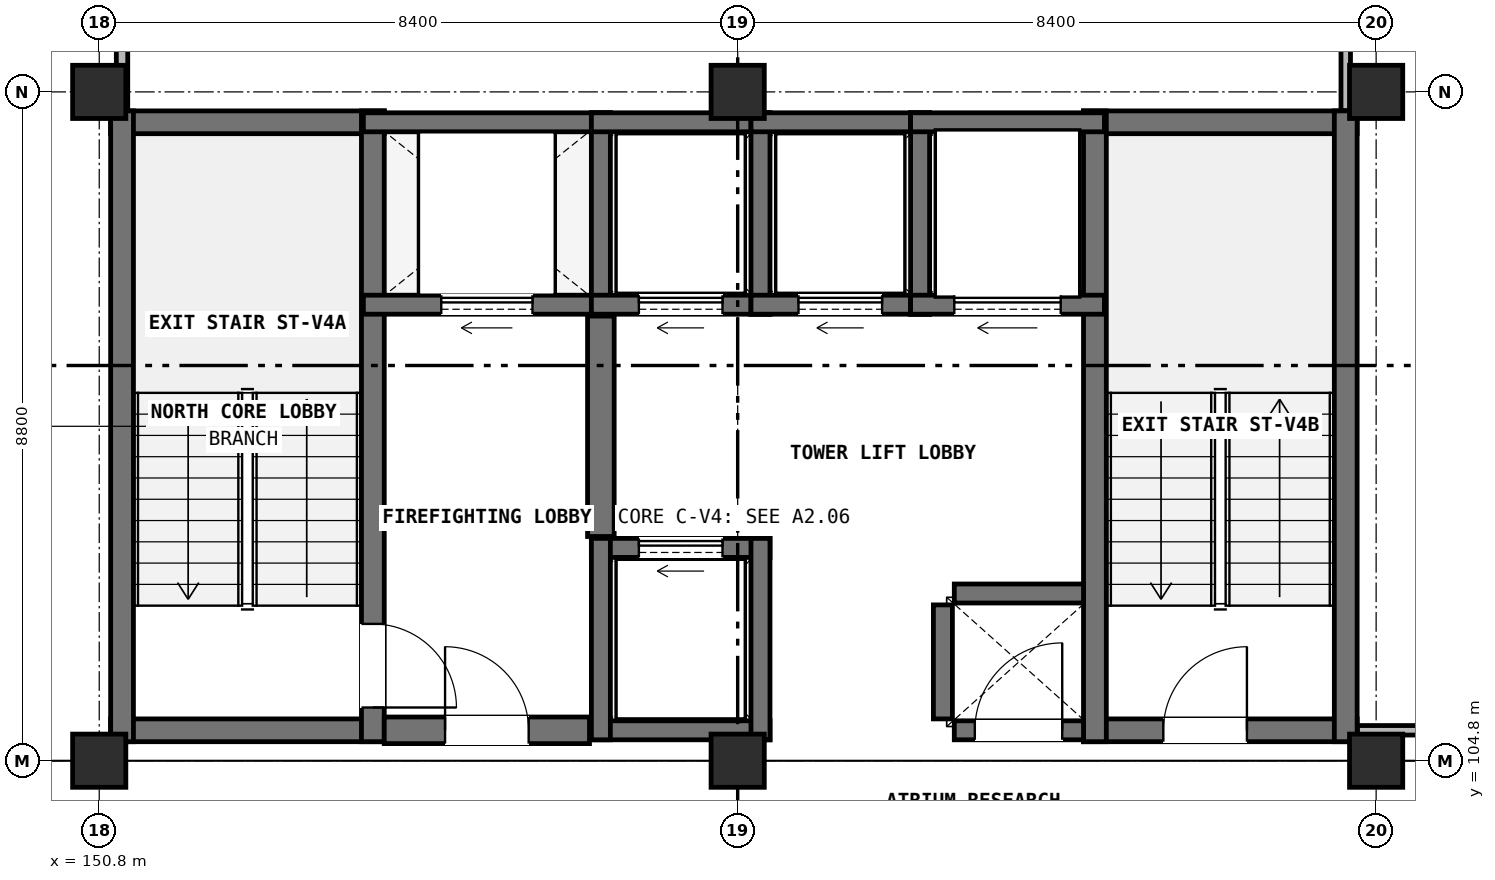
"""IFC4 building model, lengths in metres.
Left out: names, types, materials, properties, quantities, classifications, styles, units other than length and angle.
Written with IfcOpenShell. Run it as: python <this file> out.ifc"""

import sys

from ifc_helpers import new_model, si_unit, direction, frame, frame_2d, origin, origin_2d, place, context, subcontext, project, spatial, rectangle, extrude, element, fill, save


model = new_model("IFC4")
c1 = context("Model", 3, precision=1e-05, world=origin(), true_north=direction((0.0, 1.0)))
c2 = subcontext(c1, "Body", "Model", "MODEL_VIEW")
j1 = project(units=[si_unit("LENGTHUNIT", "METRE"), si_unit("PLANEANGLEUNIT", "RADIAN")], contexts=[c1])
p1 = place(None, origin())
s1 = spatial("IfcSite", under=j1, at=p1, CompositionType="ELEMENT")
p2 = place(p1, origin())
s2 = spatial("IfcBuilding", under=s1, at=p2, CompositionType="ELEMENT")
p3 = place(p2, frame((0.0, 0.0, 36.8)))
s3 = spatial("IfcBuildingStorey", under=s2, at=p3, CompositionType="ELEMENT", Elevation=36.8)
for number, where, z_axis, x_axis in (
    (1, (150.8, 104.8, 0.0), (0.0, 0.0, 1.0), (1.0, 0.0, 0.0)),
    (2, (150.8, 113.6, 0.0), (0.0, 0.0, 1.0), (1.0, 0.0, 0.0)),
    (3, (159.2, 104.8, 0.0), (0.0, 0.0, 1.0), (1.0, 0.0, 0.0)),
    (4, (159.2, 113.6, 0.0), (0.0, 0.0, 1.0), (1.0, 0.0, 0.0)),
    (5, (167.6, 104.8, 0.0), (0.0, 0.0, 1.0), (1.0, 0.0, 0.0)),
    (6, (167.6, 113.6, 0.0), (0.0, 0.0, 1.0), (1.0, 0.0, 0.0)),
):
    element("IfcColumn", number, at=place(p3, frame(where, z_axis=z_axis, x_axis=x_axis)), inside=s3, PredefinedType="COLUMN", context=c2, shape_type="SweptSolid", body=[
        extrude(rectangle(XDim=0.7, YDim=0.7, at=origin_2d()), origin(), (0.0, 0.0, 1.0), 3.8),
    ])
for number, where, z_axis, x_axis in (
    (7, (150.95, 105.2, 0.0), (0.0, 0.0, 1.0), (1.0, 0.0, 0.0)),
    (8, (150.95, 113.2, 0.0), (0.0, 0.0, 1.0), (1.0, 0.0, 0.0)),
):
    element("IfcWall", number, at=place(p3, frame(where, z_axis=z_axis, x_axis=x_axis)), inside=s3, PredefinedType="SHEAR", context=c2, shape_type="SweptSolid", body=[
        extrude(rectangle(XDim=3.6, YDim=0.3, at=frame_2d((1.8, 0.0))), origin(), (0.0, 0.0, 1.0), 3.8),
    ])
p4 = place(p3, frame((151.1, 105.05, 0.0), z_axis=(0.0, 0.0, 1.0), x_axis=(0.0, 1.0, 0.0)))
e9 = element("IfcWall", 9, at=p4, inside=s3, PredefinedType="SHEAR", context=c2, shape_type="SweptSolid", body=[
    extrude(rectangle(XDim=8.3, YDim=0.3, at=frame_2d((4.15, 0.0))), origin(), (0.0, 0.0, 1.0), 3.8),
])
p5 = place(p3, frame((154.4, 105.05, 0.0), z_axis=(0.0, 0.0, 1.0), x_axis=(0.0, 1.0, 0.0)))
e10 = element("IfcWall", 10, at=p5, inside=s3, PredefinedType="SHEAR", context=c2, shape_type="SweptSolid", body=[
    extrude(rectangle(XDim=8.3, YDim=0.3, at=frame_2d((4.15, 0.0))), origin(), (0.0, 0.0, 1.0), 3.8),
])
p6 = place(p5, frame((0.45, 0.0, 0.0)))
e11 = element("IfcOpeningElement", 11, at=p6, cuts=e10, PredefinedType="OPENING", context=c2, shape_type="SweptSolid", body=[
    extrude(rectangle(XDim=1.1, YDim=2.2, at=frame_2d((0.55, 1.1))), frame((0.0, 0.16, 0.0), z_axis=(0.0, -1.0, 0.0), x_axis=(1.0, 0.0, 0.0)), (0.0, 0.0, 1.0), 0.32),
])
p7 = place(p3, frame((163.75, 105.2, 0.0), z_axis=(0.0, 0.0, 1.0), x_axis=(1.0, 0.0, 0.0)))
e12 = element("IfcWall", 12, at=p7, inside=s3, PredefinedType="SHEAR", context=c2, shape_type="SweptSolid", body=[
    extrude(rectangle(XDim=3.6, YDim=0.3, at=frame_2d((1.8, 0.0))), origin(), (0.0, 0.0, 1.0), 3.8),
])
p8 = place(p7, frame((1.05, 0.0, 0.0)))
e13 = element("IfcOpeningElement", 13, at=p8, cuts=e12, PredefinedType="OPENING", context=c2, shape_type="SweptSolid", body=[
    extrude(rectangle(XDim=1.1, YDim=2.2, at=frame_2d((0.55, 1.1))), frame((0.0, 0.16, 0.0), z_axis=(0.0, -1.0, 0.0), x_axis=(1.0, 0.0, 0.0)), (0.0, 0.0, 1.0), 0.32),
])
p9 = place(p3, frame((163.75, 113.2, 0.0), z_axis=(0.0, 0.0, 1.0), x_axis=(1.0, 0.0, 0.0)))
e14 = element("IfcWall", 14, at=p9, inside=s3, PredefinedType="SHEAR", context=c2, shape_type="SweptSolid", body=[
    extrude(rectangle(XDim=3.6, YDim=0.3, at=frame_2d((1.8, 0.0))), origin(), (0.0, 0.0, 1.0), 3.8),
])
for number, where, z_axis, x_axis in (
    (15, (163.9, 105.05, 0.0), (0.0, 0.0, 1.0), (0.0, 1.0, 0.0)),
    (16, (167.2, 105.05, 0.0), (0.0, 0.0, 1.0), (0.0, 1.0, 0.0)),
):
    element("IfcWall", number, at=place(p3, frame(where, z_axis=z_axis, x_axis=x_axis)), inside=s3, PredefinedType="SHEAR", context=c2, shape_type="SweptSolid", body=[
        extrude(rectangle(XDim=8.3, YDim=0.3, at=frame_2d((4.15, 0.0))), origin(), (0.0, 0.0, 1.0), 3.8),
    ])
p10 = place(p3, frame((154.275, 110.8, 0.0), z_axis=(0.0, 0.0, 1.0), x_axis=(1.0, 0.0, 0.0)))
e17 = element("IfcWall", 17, at=p10, inside=s3, PredefinedType="SOLIDWALL", context=c2, shape_type="SweptSolid", body=[
    extrude(rectangle(XDim=3.25, YDim=0.25, at=frame_2d((1.625, 0.0))), origin(), (0.0, 0.0, 1.0), 3.48),
])
p11 = place(p10, frame((1.025, 0.0, 0.0)))
e18 = element("IfcOpeningElement", 18, at=p11, cuts=e17, PredefinedType="OPENING", context=c2, shape_type="SweptSolid", body=[
    extrude(rectangle(XDim=1.2, YDim=2.2, at=frame_2d((0.6, 1.1))), frame((0.0, 0.135, 0.0), z_axis=(0.0, -1.0, 0.0), x_axis=(1.0, 0.0, 0.0)), (0.0, 0.0, 1.0), 0.27),
])
p12 = place(p3, frame((154.275, 113.2, 0.0), z_axis=(0.0, 0.0, 1.0), x_axis=(1.0, 0.0, 0.0)))
e19 = element("IfcWall", 19, at=p12, inside=s3, PredefinedType="SOLIDWALL", context=c2, shape_type="SweptSolid", body=[
    extrude(rectangle(XDim=3.25, YDim=0.25, at=frame_2d((1.625, 0.0))), origin(), (0.0, 0.0, 1.0), 3.48),
])
p13 = place(p3, frame((157.4, 110.675, 0.0), z_axis=(0.0, 0.0, 1.0), x_axis=(0.0, 1.0, 0.0)))
e20 = element("IfcWall", 20, at=p13, inside=s3, PredefinedType="SOLIDWALL", context=c2, shape_type="SweptSolid", body=[
    extrude(rectangle(XDim=2.65, YDim=0.25, at=frame_2d((1.325, 0.0))), origin(), (0.0, 0.0, 1.0), 3.48),
])
p14 = place(p3, frame((157.275, 110.8, 0.0), z_axis=(0.0, 0.0, 1.0), x_axis=(1.0, 0.0, 0.0)))
e21 = element("IfcWall", 21, at=p14, inside=s3, PredefinedType="SOLIDWALL", context=c2, shape_type="SweptSolid", body=[
    extrude(rectangle(XDim=2.35, YDim=0.25, at=frame_2d((1.175, 0.0))), origin(), (0.0, 0.0, 1.0), 3.48),
])
p15 = place(p14, frame((0.625, 0.0, 0.0)))
e22 = element("IfcOpeningElement", 22, at=p15, cuts=e21, PredefinedType="OPENING", context=c2, shape_type="SweptSolid", body=[
    extrude(rectangle(XDim=1.1, YDim=2.2, at=frame_2d((0.55, 1.1))), frame((0.0, 0.135, 0.0), z_axis=(0.0, -1.0, 0.0), x_axis=(1.0, 0.0, 0.0)), (0.0, 0.0, 1.0), 0.27),
])
p16 = place(p3, frame((157.275, 113.2, 0.0), z_axis=(0.0, 0.0, 1.0), x_axis=(1.0, 0.0, 0.0)))
e23 = element("IfcWall", 23, at=p16, inside=s3, PredefinedType="SOLIDWALL", context=c2, shape_type="SweptSolid", body=[
    extrude(rectangle(XDim=2.35, YDim=0.25, at=frame_2d((1.175, 0.0))), origin(), (0.0, 0.0, 1.0), 3.48),
])
p17 = place(p3, frame((159.5, 110.675, 0.0), z_axis=(0.0, 0.0, 1.0), x_axis=(0.0, 1.0, 0.0)))
e24 = element("IfcWall", 24, at=p17, inside=s3, PredefinedType="SOLIDWALL", context=c2, shape_type="SweptSolid", body=[
    extrude(rectangle(XDim=2.65, YDim=0.25, at=frame_2d((1.325, 0.0))), origin(), (0.0, 0.0, 1.0), 3.48),
])
p18 = place(p3, frame((159.375, 110.8, 0.0), z_axis=(0.0, 0.0, 1.0), x_axis=(1.0, 0.0, 0.0)))
e25 = element("IfcWall", 25, at=p18, inside=s3, PredefinedType="SOLIDWALL", context=c2, shape_type="SweptSolid", body=[
    extrude(rectangle(XDim=2.35, YDim=0.25, at=frame_2d((1.175, 0.0))), origin(), (0.0, 0.0, 1.0), 3.48),
])
p19 = place(p18, frame((0.625, 0.0, 0.0)))
e26 = element("IfcOpeningElement", 26, at=p19, cuts=e25, PredefinedType="OPENING", context=c2, shape_type="SweptSolid", body=[
    extrude(rectangle(XDim=1.1, YDim=2.2, at=frame_2d((0.55, 1.1))), frame((0.0, 0.135, 0.0), z_axis=(0.0, -1.0, 0.0), x_axis=(1.0, 0.0, 0.0)), (0.0, 0.0, 1.0), 0.27),
])
p20 = place(p3, frame((159.375, 113.2, 0.0), z_axis=(0.0, 0.0, 1.0), x_axis=(1.0, 0.0, 0.0)))
e27 = element("IfcWall", 27, at=p20, inside=s3, PredefinedType="SOLIDWALL", context=c2, shape_type="SweptSolid", body=[
    extrude(rectangle(XDim=2.35, YDim=0.25, at=frame_2d((1.175, 0.0))), origin(), (0.0, 0.0, 1.0), 3.48),
])
p21 = place(p3, frame((161.6, 110.675, 0.0), z_axis=(0.0, 0.0, 1.0), x_axis=(0.0, 1.0, 0.0)))
e28 = element("IfcWall", 28, at=p21, inside=s3, PredefinedType="SOLIDWALL", context=c2, shape_type="SweptSolid", body=[
    extrude(rectangle(XDim=2.65, YDim=0.25, at=frame_2d((1.325, 0.0))), origin(), (0.0, 0.0, 1.0), 3.48),
])
p22 = place(p3, frame((157.275, 105.2, 0.0), z_axis=(0.0, 0.0, 1.0), x_axis=(1.0, 0.0, 0.0)))
e29 = element("IfcWall", 29, at=p22, inside=s3, PredefinedType="SOLIDWALL", context=c2, shape_type="SweptSolid", body=[
    extrude(rectangle(XDim=2.35, YDim=0.25, at=frame_2d((1.175, 0.0))), origin(), (0.0, 0.0, 1.0), 3.48),
])
p23 = place(p3, frame((157.275, 107.6, 0.0), z_axis=(0.0, 0.0, 1.0), x_axis=(1.0, 0.0, 0.0)))
e30 = element("IfcWall", 30, at=p23, inside=s3, PredefinedType="SOLIDWALL", context=c2, shape_type="SweptSolid", body=[
    extrude(rectangle(XDim=2.35, YDim=0.25, at=frame_2d((1.175, 0.0))), origin(), (0.0, 0.0, 1.0), 3.48),
])
p24 = place(p23, frame((0.625, 0.0, 0.0)))
e31 = element("IfcOpeningElement", 31, at=p24, cuts=e30, PredefinedType="OPENING", context=c2, shape_type="SweptSolid", body=[
    extrude(rectangle(XDim=1.1, YDim=2.2, at=frame_2d((0.55, 1.1))), frame((0.0, 0.135, 0.0), z_axis=(0.0, -1.0, 0.0), x_axis=(1.0, 0.0, 0.0)), (0.0, 0.0, 1.0), 0.27),
])
for number, where, z_axis, x_axis in (
    (32, (157.4, 105.075, 0.0), (0.0, 0.0, 1.0), (0.0, 1.0, 0.0)),
    (33, (159.5, 105.075, 0.0), (0.0, 0.0, 1.0), (0.0, 1.0, 0.0)),
):
    element("IfcWall", number, at=place(p3, frame(where, z_axis=z_axis, x_axis=x_axis)), inside=s3, PredefinedType="SOLIDWALL", context=c2, shape_type="SweptSolid", body=[
        extrude(rectangle(XDim=2.65, YDim=0.25, at=frame_2d((1.325, 0.0))), origin(), (0.0, 0.0, 1.0), 3.48),
    ])
p25 = place(p3, frame((161.475, 110.8, 0.0), z_axis=(0.0, 0.0, 1.0), x_axis=(1.0, 0.0, 0.0)))
e34 = element("IfcWall", 34, at=p25, inside=s3, PredefinedType="SOLIDWALL", context=c2, shape_type="SweptSolid", body=[
    extrude(rectangle(XDim=2.55, YDim=0.25, at=frame_2d((1.275, 0.0))), origin(), (0.0, 0.0, 1.0), 3.48),
])
p26 = place(p25, frame((0.575, 0.0, 0.0)))
e35 = element("IfcOpeningElement", 35, at=p26, cuts=e34, PredefinedType="OPENING", context=c2, shape_type="SweptSolid", body=[
    extrude(rectangle(XDim=1.4, YDim=2.3, at=frame_2d((0.7, 1.15))), frame((0.0, 0.135, 0.0), z_axis=(0.0, -1.0, 0.0), x_axis=(1.0, 0.0, 0.0)), (0.0, 0.0, 1.0), 0.27),
])
p27 = place(p3, frame((161.475, 113.2, 0.0), z_axis=(0.0, 0.0, 1.0), x_axis=(1.0, 0.0, 0.0)))
e36 = element("IfcWall", 36, at=p27, inside=s3, PredefinedType="SOLIDWALL", context=c2, shape_type="SweptSolid", body=[
    extrude(rectangle(XDim=2.55, YDim=0.25, at=frame_2d((1.275, 0.0))), origin(), (0.0, 0.0, 1.0), 3.48),
])
p28 = place(p3, frame((157.4, 107.75, 0.0), z_axis=(0.0, 0.0, 1.0), x_axis=(0.0, 1.0, 0.0)))
e37 = element("IfcWall", 37, at=p28, inside=s3, PredefinedType="SHEAR", context=c2, shape_type="SweptSolid", body=[
    extrude(rectangle(XDim=2.9, YDim=0.35, at=frame_2d((1.45, 0.0))), origin(), (0.0, 0.0, 1.0), 3.48),
])
p29 = place(p3, frame((154.55, 105.2, 0.0), z_axis=(0.0, 0.0, 1.0), x_axis=(1.0, 0.0, 0.0)))
e38 = element("IfcWall", 38, at=p29, inside=s3, PredefinedType="SHEAR", context=c2, shape_type="SweptSolid", body=[
    extrude(rectangle(XDim=2.7, YDim=0.35, at=frame_2d((1.35, 0.0))), origin(), (0.0, 0.0, 1.0), 3.48),
])
p30 = place(p29, frame((0.8, 0.0, 0.0)))
e39 = element("IfcOpeningElement", 39, at=p30, cuts=e38, PredefinedType="OPENING", context=c2, shape_type="SweptSolid", body=[
    extrude(rectangle(XDim=1.1, YDim=2.2, at=frame_2d((0.55, 1.1))), frame((0.0, 0.185, 0.0), z_axis=(0.0, -1.0, 0.0), x_axis=(1.0, 0.0, 0.0)), (0.0, 0.0, 1.0), 0.37),
])
p31 = place(p3, frame((161.9, 105.35, 0.0), z_axis=(0.0, 0.0, 1.0), x_axis=(0.0, 1.0, 0.0)))
e40 = element("IfcWall", 40, at=p31, inside=s3, PredefinedType="SOLIDWALL", context=c2, shape_type="SweptSolid", body=[
    extrude(rectangle(XDim=1.5, YDim=0.25, at=frame_2d((0.75, 0.0))), origin(), (0.0, 0.0, 1.0), 3.48),
])
p32 = place(p3, frame((162.05, 107.0, 0.0), z_axis=(0.0, 0.0, 1.0), x_axis=(1.0, 0.0, 0.0)))
e41 = element("IfcWall", 41, at=p32, inside=s3, PredefinedType="SOLIDWALL", context=c2, shape_type="SweptSolid", body=[
    extrude(rectangle(XDim=1.7, YDim=0.25, at=frame_2d((0.85, 0.0))), origin(), (0.0, 0.0, 1.0), 3.48),
])
p33 = place(p3, frame((162.05, 105.2, 0.0), z_axis=(0.0, 0.0, 1.0), x_axis=(1.0, 0.0, 0.0)))
e42 = element("IfcWall", 42, at=p33, inside=s3, PredefinedType="SOLIDWALL", context=c2, shape_type="SweptSolid", body=[
    extrude(rectangle(XDim=1.7, YDim=0.25, at=frame_2d((0.85, 0.0))), origin(), (0.0, 0.0, 1.0), 3.48),
])
p34 = place(p33, frame((0.27, 0.0, 0.0)))
e43 = element("IfcOpeningElement", 43, at=p34, cuts=e42, PredefinedType="OPENING", context=c2, shape_type="SweptSolid", body=[
    extrude(rectangle(XDim=1.15, YDim=2.2, at=frame_2d((0.575, 1.1))), frame((0.0, 0.135, 0.0), z_axis=(0.0, -1.0, 0.0), x_axis=(1.0, 0.0, 0.0)), (0.0, 0.0, 1.0), 0.27),
])
p35 = place(p3, frame((167.355, 105.2, 0.0), z_axis=(0.0, 0.0, 1.0), x_axis=(1.0, 0.0, 0.0)))
e44 = element("IfcWall", 44, at=p35, inside=s3, PredefinedType="PARTITIONING", context=c2, shape_type="SweptSolid", body=[
    extrude(rectangle(XDim=4.245, YDim=0.125, at=frame_2d((2.123, 0.0))), origin(), (0.0, 0.0, 1.0), 3.045),
])
p36 = place(p35, frame((1.633, 0.0, 0.0)))
e45 = element("IfcOpeningElement", 45, at=p36, cuts=e44, PredefinedType="OPENING", context=c2, shape_type="SweptSolid", body=[
    extrude(rectangle(XDim=0.98, YDim=2.1, at=frame_2d((0.49, 1.05))), frame((0.0, 0.073, 0.0), z_axis=(0.0, -1.0, 0.0), x_axis=(1.0, 0.0, 0.0)), (0.0, 0.0, 1.0), 0.145),
])
p37 = place(p3, frame((151.1, 113.355, 0.0), z_axis=(0.0, 0.0, 1.0), x_axis=(0.0, 1.0, 0.0)))
e46 = element("IfcWall", 46, at=p37, inside=s3, PredefinedType="PARTITIONING", context=c2, shape_type="SweptSolid", body=[
    extrude(rectangle(XDim=6.045, YDim=0.15, at=frame_2d((3.022, 0.0))), origin(), (0.0, 0.0, 1.0), 3.045),
])
p38 = place(p37, frame((2.542, 0.0, 0.0)))
e47 = element("IfcOpeningElement", 47, at=p38, cuts=e46, PredefinedType="OPENING", context=c2, shape_type="SweptSolid", body=[
    extrude(rectangle(XDim=0.96, YDim=2.14, at=frame_2d((0.48, 1.07))), frame((0.0, 0.085, 0.0), z_axis=(0.0, -1.0, 0.0), x_axis=(1.0, 0.0, 0.0)), (0.0, 0.0, 1.0), 0.17),
])
p39 = place(p3, frame((167.2, 113.355, 0.0), z_axis=(0.0, 0.0, 1.0), x_axis=(0.0, 1.0, 0.0)))
e48 = element("IfcWall", 48, at=p39, inside=s3, PredefinedType="PARTITIONING", context=c2, shape_type="SweptSolid", body=[
    extrude(rectangle(XDim=8.695, YDim=0.125, at=frame_2d((4.348, 0.0))), origin(), (0.0, 0.0, 1.0), 3.045),
])
p40 = place(p6, frame((1.1, 0.0, 0.0), z_axis=(0.0, 0.0, 1.0), x_axis=(-1.0, 0.0, 0.0)))
e49 = element("IfcDoor", 49, at=p40, inside=s3, OperationType="SINGLE_SWING_LEFT", PredefinedType="DOOR", context=c2, shape_type="SweptSolid", body=[
    extrude(rectangle(XDim=1.1, YDim=2.2, at=frame_2d((0.55, 1.1))), frame((0.0, 0.025, 0.0), z_axis=(0.0, -1.0, 0.0), x_axis=(1.0, 0.0, 0.0)), (0.0, 0.0, 1.0), 0.05),
])
fill(e11, e49)
p41 = place(p8, origin())
e50 = element("IfcDoor", 50, at=p41, inside=s3, OperationType="SINGLE_SWING_RIGHT", PredefinedType="DOOR", context=c2, shape_type="SweptSolid", body=[
    extrude(rectangle(XDim=1.1, YDim=2.2, at=frame_2d((0.55, 1.1))), frame((0.0, 0.025, 0.0), z_axis=(0.0, -1.0, 0.0), x_axis=(1.0, 0.0, 0.0)), (0.0, 0.0, 1.0), 0.05),
])
fill(e13, e50)
p42 = place(p11, origin())
e51 = element("IfcDoor", 51, at=p42, inside=s3, OperationType="SLIDING_TO_LEFT", PredefinedType="DOOR", context=c2, shape_type="SweptSolid", body=[
    extrude(rectangle(XDim=1.2, YDim=2.2, at=frame_2d((0.6, 1.1))), frame((0.0, 0.025, 0.0), z_axis=(0.0, -1.0, 0.0), x_axis=(1.0, 0.0, 0.0)), (0.0, 0.0, 1.0), 0.05),
])
fill(e18, e51)
p43 = place(p15, origin())
e52 = element("IfcDoor", 52, at=p43, inside=s3, OperationType="SLIDING_TO_LEFT", PredefinedType="DOOR", context=c2, shape_type="SweptSolid", body=[
    extrude(rectangle(XDim=1.1, YDim=2.2, at=frame_2d((0.55, 1.1))), frame((0.0, 0.025, 0.0), z_axis=(0.0, -1.0, 0.0), x_axis=(1.0, 0.0, 0.0)), (0.0, 0.0, 1.0), 0.05),
])
fill(e22, e52)
p44 = place(p19, origin())
e53 = element("IfcDoor", 53, at=p44, inside=s3, OperationType="SLIDING_TO_LEFT", PredefinedType="DOOR", context=c2, shape_type="SweptSolid", body=[
    extrude(rectangle(XDim=1.1, YDim=2.2, at=frame_2d((0.55, 1.1))), frame((0.0, 0.025, 0.0), z_axis=(0.0, -1.0, 0.0), x_axis=(1.0, 0.0, 0.0)), (0.0, 0.0, 1.0), 0.05),
])
fill(e26, e53)
p45 = place(p24, origin())
e54 = element("IfcDoor", 54, at=p45, inside=s3, OperationType="SLIDING_TO_LEFT", PredefinedType="DOOR", context=c2, shape_type="SweptSolid", body=[
    extrude(rectangle(XDim=1.1, YDim=2.2, at=frame_2d((0.55, 1.1))), frame((0.0, 0.025, 0.0), z_axis=(0.0, -1.0, 0.0), x_axis=(1.0, 0.0, 0.0)), (0.0, 0.0, 1.0), 0.05),
])
fill(e31, e54)
p46 = place(p26, origin())
e55 = element("IfcDoor", 55, at=p46, inside=s3, OperationType="SLIDING_TO_LEFT", PredefinedType="DOOR", context=c2, shape_type="SweptSolid", body=[
    extrude(rectangle(XDim=1.4, YDim=2.3, at=frame_2d((0.7, 1.15))), frame((0.0, 0.025, 0.0), z_axis=(0.0, -1.0, 0.0), x_axis=(1.0, 0.0, 0.0)), (0.0, 0.0, 1.0), 0.05),
])
fill(e35, e55)
p47 = place(p30, origin())
e56 = element("IfcDoor", 56, at=p47, inside=s3, OperationType="SINGLE_SWING_LEFT", PredefinedType="DOOR", context=c2, shape_type="SweptSolid", body=[
    extrude(rectangle(XDim=1.1, YDim=2.2, at=frame_2d((0.55, 1.1))), frame((0.0, 0.025, 0.0), z_axis=(0.0, -1.0, 0.0), x_axis=(1.0, 0.0, 0.0)), (0.0, 0.0, 1.0), 0.05),
])
fill(e39, e56)
p48 = place(p34, origin())
e57 = element("IfcDoor", 57, at=p48, inside=s3, OperationType="SINGLE_SWING_RIGHT", PredefinedType="DOOR", context=c2, shape_type="SweptSolid", body=[
    extrude(rectangle(XDim=1.15, YDim=2.2, at=frame_2d((0.575, 1.1))), frame((0.0, 0.025, 0.0), z_axis=(0.0, -1.0, 0.0), x_axis=(1.0, 0.0, 0.0)), (0.0, 0.0, 1.0), 0.05),
])
fill(e43, e57)
save(model, sys.argv[1])
